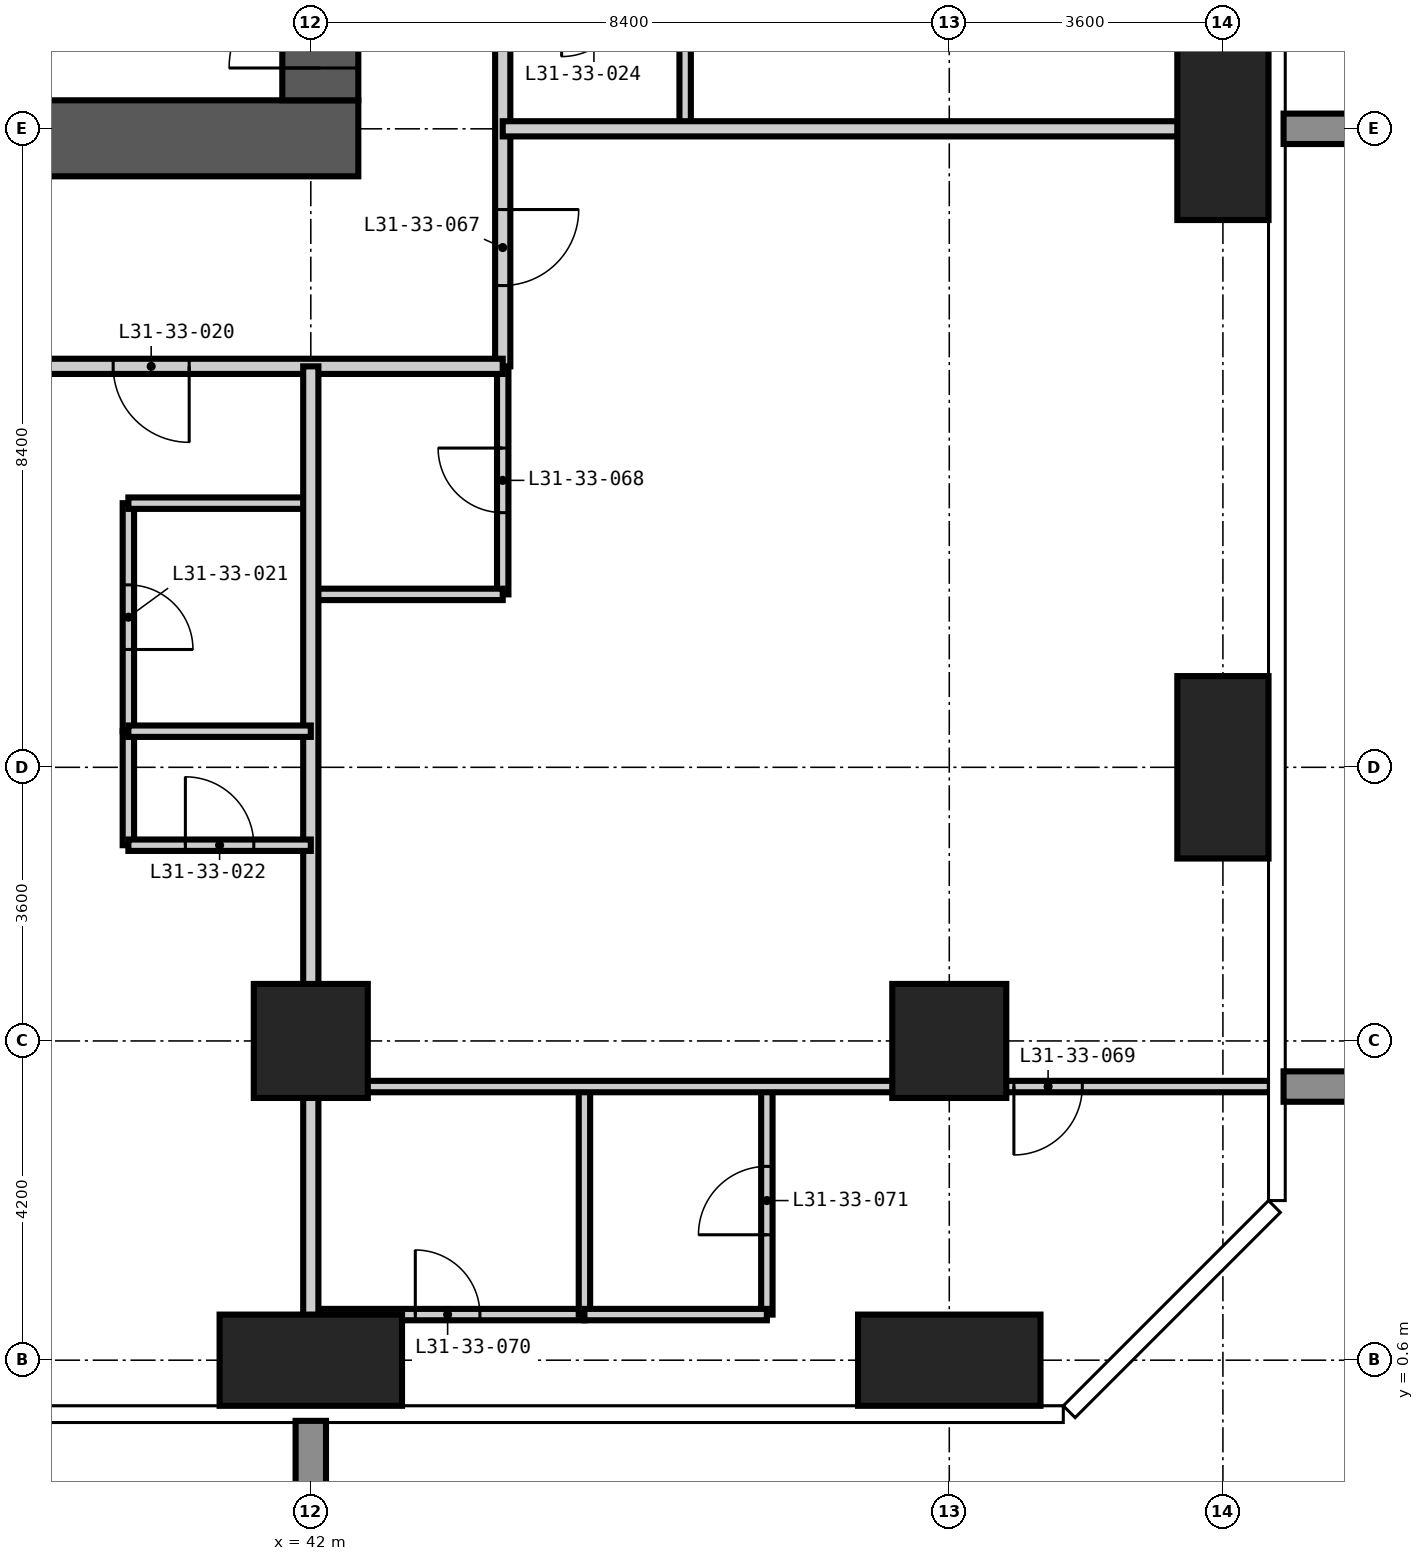
"""IFC4 building model, lengths in metres.
Left out: names, types, materials, properties, quantities, classifications, styles, units other than length and angle.
Written with IfcOpenShell. Run it as: python <this file> out.ifc"""

import sys

from ifc_helpers import new_model, si_unit, direction, frame, frame_2d, origin, origin_2d, place, context, subcontext, project, spatial, rectangle, extrude, element, fill, save


model = new_model("IFC4")
c1 = context("Model", 3, precision=1e-05, world=origin(), true_north=direction((0.0, 1.0)))
c2 = subcontext(c1, "Body", "Model", "MODEL_VIEW")
j1 = project(units=[si_unit("LENGTHUNIT", "METRE"), si_unit("PLANEANGLEUNIT", "RADIAN")], contexts=[c1])
p1 = place(None, origin())
s1 = spatial("IfcSite", under=j1, at=p1, CompositionType="ELEMENT")
p2 = place(p1, origin())
s2 = spatial("IfcBuilding", under=s1, at=p2, CompositionType="ELEMENT")
p3 = place(p2, frame((0.0, 0.0, 122.4)))
s3 = spatial("IfcBuildingStorey", under=s2, at=p3, CompositionType="ELEMENT", Elevation=122.4)
p4 = place(p3, frame((42.0, 0.6, -0.35), z_axis=(0.0, 0.0, 1.0), x_axis=(1.0, 0.0, 0.0)))
e1 = element("IfcColumn", 1, at=p4, inside=s3, PredefinedType="COLUMN", context=c2, shape_type="SweptSolid", body=[
    extrude(rectangle(XDim=2.4, YDim=1.2, at=origin_2d()), origin(), (0.0, 0.0, 1.0), 3.6),
])
p5 = place(p3, frame((42.0, 4.8, -0.35), z_axis=(0.0, 0.0, 1.0), x_axis=(1.0, 0.0, 0.0)))
e2 = element("IfcColumn", 2, at=p5, inside=s3, PredefinedType="COLUMN", context=c2, shape_type="SweptSolid", body=[
    extrude(rectangle(XDim=1.5, YDim=1.5, at=origin_2d()), origin(), (0.0, 0.0, 1.0), 3.6),
])
p6 = place(p3, frame((50.4, 0.6, -0.35), z_axis=(0.0, 0.0, 1.0), x_axis=(1.0, 0.0, 0.0)))
e3 = element("IfcColumn", 3, at=p6, inside=s3, PredefinedType="COLUMN", context=c2, shape_type="SweptSolid", body=[
    extrude(rectangle(XDim=2.4, YDim=1.2, at=origin_2d()), origin(), (0.0, 0.0, 1.0), 3.6),
])
p7 = place(p3, frame((50.4, 4.8, -0.35), z_axis=(0.0, 0.0, 1.0), x_axis=(1.0, 0.0, 0.0)))
e4 = element("IfcColumn", 4, at=p7, inside=s3, PredefinedType="COLUMN", context=c2, shape_type="SweptSolid", body=[
    extrude(rectangle(XDim=1.5, YDim=1.5, at=origin_2d()), origin(), (0.0, 0.0, 1.0), 3.6),
])
for number, where, z_axis, x_axis in (
    (5, (54.0, 8.4, -0.35), (0.0, 0.0, 1.0), (1.0, 0.0, 0.0)),
    (6, (54.0, 16.8, -0.35), (0.0, 0.0, 1.0), (1.0, 0.0, 0.0)),
):
    element("IfcColumn", number, at=place(p3, frame(where, z_axis=z_axis, x_axis=x_axis)), inside=s3, PredefinedType="COLUMN", context=c2, shape_type="SweptSolid", body=[
        extrude(rectangle(XDim=1.2, YDim=2.4, at=origin_2d()), origin(), (0.0, 0.0, 1.0), 3.6),
    ])
p8 = place(p3, frame((16.175, 16.675, -0.35), z_axis=(0.0, 0.0, 1.0), x_axis=(1.0, 0.0, 0.0)))
e7 = element("IfcWall", 7, at=p8, inside=s3, PredefinedType="SHEAR", context=c2, shape_type="SweptSolid", body=[
    extrude(rectangle(XDim=26.45, YDim=1.0, at=frame_2d((13.225, 0.0))), origin(), (0.0, 0.0, 1.0), 3.6),
])
p9 = place(p8, frame((12.725, 0.0, 0.35)))
e8 = element("IfcOpeningElement", 8, at=p9, cuts=e7, PredefinedType="OPENING", context=c2, shape_type="SweptSolid", body=[
    extrude(rectangle(XDim=1.0, YDim=2.1, at=frame_2d((0.5, 1.05))), frame((0.0, 0.51, 0.0), z_axis=(0.0, -1.0, 0.0), x_axis=(1.0, 0.0, 0.0)), (0.0, 0.0, 1.0), 1.02),
])
p10 = place(p8, frame((19.025, 0.0, 0.35)))
e9 = element("IfcOpeningElement", 9, at=p10, cuts=e7, PredefinedType="OPENING", context=c2, shape_type="SweptSolid", body=[
    extrude(rectangle(XDim=1.0, YDim=2.1, at=frame_2d((0.5, 1.05))), frame((0.0, 0.51, 0.0), z_axis=(0.0, -1.0, 0.0), x_axis=(1.0, 0.0, 0.0)), (0.0, 0.0, 1.0), 1.02),
])
p11 = place(p3, frame((42.125, 17.175, -0.35), z_axis=(0.0, 0.0, 1.0), x_axis=(0.0, 1.0, 0.0)))
e10 = element("IfcWall", 10, at=p11, inside=s3, PredefinedType="SHEAR", context=c2, shape_type="SweptSolid", body=[
    extrude(rectangle(XDim=24.45, YDim=1.0, at=frame_2d((12.225, 0.0))), origin(), (0.0, 0.0, 1.0), 3.6),
])
p12 = place(p11, frame((0.425, 0.0, 0.35)))
e11 = element("IfcOpeningElement", 11, at=p12, cuts=e10, PredefinedType="OPENING", context=c2, shape_type="SweptSolid", body=[
    extrude(rectangle(XDim=1.2, YDim=2.2, at=frame_2d((0.6, 1.1))), frame((0.0, 0.51, 0.0), z_axis=(0.0, -1.0, 0.0), x_axis=(1.0, 0.0, 0.0)), (0.0, 0.0, 1.0), 1.02),
])
p13 = place(p11, frame((11.325, 0.0, 0.35)))
e12 = element("IfcOpeningElement", 12, at=p13, cuts=e10, PredefinedType="OPENING", context=c2, shape_type="SweptSolid", body=[
    extrude(rectangle(XDim=1.8, YDim=2.2, at=frame_2d((0.9, 1.1))), frame((0.0, 0.51, 0.0), z_axis=(0.0, -1.0, 0.0), x_axis=(1.0, 0.0, 0.0)), (0.0, 0.0, 1.0), 1.02),
])
p14 = place(p11, frame((20.125, 0.0, 0.35)))
e13 = element("IfcOpeningElement", 13, at=p14, cuts=e10, PredefinedType="OPENING", context=c2, shape_type="SweptSolid", body=[
    extrude(rectangle(XDim=1.0, YDim=2.1, at=frame_2d((0.5, 1.05))), frame((0.0, 0.51, 0.0), z_axis=(0.0, -1.0, 0.0), x_axis=(1.0, 0.0, 0.0)), (0.0, 0.0, 1.0), 1.02),
])
p15 = place(p3, frame((39.6, 8.875, 0.0), z_axis=(0.0, 0.0, 1.0), x_axis=(0.0, 1.0, 0.0)))
e14 = element("IfcWall", 14, at=p15, inside=s3, PredefinedType="PARTITIONING", context=c2, shape_type="SweptSolid", body=[
    extrude(rectangle(XDim=3.0, YDim=0.15, at=frame_2d((1.5, 0.0))), origin(), (0.0, 0.0, 1.0), 3.25),
])
p16 = place(p15, frame((1.075, 0.0, 0.0)))
e15 = element("IfcOpeningElement", 15, at=p16, cuts=e14, PredefinedType="OPENING", context=c2, shape_type="SweptSolid", body=[
    extrude(rectangle(XDim=0.85, YDim=2.1, at=frame_2d((0.425, 1.05))), frame((0.0, 0.085, 0.0), z_axis=(0.0, -1.0, 0.0), x_axis=(1.0, 0.0, 0.0)), (0.0, 0.0, 1.0), 0.17),
])
p17 = place(p3, frame((44.525, 10.675, 0.0), z_axis=(0.0, 0.0, 1.0), x_axis=(0.0, 1.0, 0.0)))
e16 = element("IfcWall", 16, at=p17, inside=s3, PredefinedType="PARTITIONING", context=c2, shape_type="SweptSolid", body=[
    extrude(rectangle(XDim=3.0, YDim=0.15, at=frame_2d((1.5, 0.0))), origin(), (0.0, 0.0, 1.0), 3.25),
])
p18 = place(p17, frame((1.075, 0.0, 0.0)))
e17 = element("IfcOpeningElement", 17, at=p18, cuts=e16, PredefinedType="OPENING", context=c2, shape_type="SweptSolid", body=[
    extrude(rectangle(XDim=0.85, YDim=2.1, at=frame_2d((0.425, 1.05))), frame((0.0, 0.085, 0.0), z_axis=(0.0, -1.0, 0.0), x_axis=(1.0, 0.0, 0.0)), (0.0, 0.0, 1.0), 0.17),
])
p19 = place(p3, frame((46.925, 16.8, 0.0), z_axis=(0.0, 0.0, 1.0), x_axis=(0.0, 1.0, 0.0)))
e18 = element("IfcWall", 18, at=p19, inside=s3, PredefinedType="PARTITIONING", context=c2, shape_type="SweptSolid", body=[
    extrude(rectangle(XDim=1.8, YDim=0.15, at=frame_2d((0.9, 0.0))), origin(), (0.0, 0.0, 1.0), 3.25),
])
p20 = place(p3, frame((42.0, 1.2, 0.0), z_axis=(0.0, 0.0, 1.0), x_axis=(1.0, 0.0, 0.0)))
e19 = element("IfcWall", 19, at=p20, inside=s3, PredefinedType="PARTITIONING", context=c2, shape_type="SweptSolid", body=[
    extrude(rectangle(XDim=3.6, YDim=0.15, at=frame_2d((1.8, 0.0))), origin(), (0.0, 0.0, 1.0), 3.25),
])
p21 = place(p20, frame((1.375, 0.0, 0.0)))
e20 = element("IfcOpeningElement", 20, at=p21, cuts=e19, PredefinedType="OPENING", context=c2, shape_type="SweptSolid", body=[
    extrude(rectangle(XDim=0.85, YDim=2.1, at=frame_2d((0.425, 1.05))), frame((0.0, 0.085, 0.0), z_axis=(0.0, -1.0, 0.0), x_axis=(1.0, 0.0, 0.0)), (0.0, 0.0, 1.0), 0.17),
])
p22 = place(p3, frame((42.0, 10.675, 0.0), z_axis=(0.0, 0.0, 1.0), x_axis=(1.0, 0.0, 0.0)))
e21 = element("IfcWall", 21, at=p22, inside=s3, PredefinedType="PARTITIONING", context=c2, shape_type="SweptSolid", body=[
    extrude(rectangle(XDim=2.525, YDim=0.15, at=frame_2d((1.262, 0.0))), origin(), (0.0, 0.0, 1.0), 3.25),
])
p23 = place(p3, frame((39.6, 11.875, 0.0), z_axis=(0.0, 0.0, 1.0), x_axis=(1.0, 0.0, 0.0)))
e22 = element("IfcWall", 22, at=p23, inside=s3, PredefinedType="PARTITIONING", context=c2, shape_type="SweptSolid", body=[
    extrude(rectangle(XDim=2.4, YDim=0.15, at=frame_2d((1.2, 0.0))), origin(), (0.0, 0.0, 1.0), 3.25),
])
p24 = place(p3, frame((44.525, 45.725, 0.0), z_axis=(0.0, 0.0, 1.0), x_axis=(0.0, -1.0, 0.0)))
e23 = element("IfcWall", 23, at=p24, inside=s3, PredefinedType="PARTITIONING", context=c2, shape_type="SweptSolid", body=[
    extrude(rectangle(XDim=32.05, YDim=0.2, at=frame_2d((16.025, 0.0))), origin(), (0.0, 0.0, 1.0), 3.25),
])
p25 = place(p24, frame((25.425, 0.0, 0.0)))
e24 = element("IfcOpeningElement", 24, at=p25, cuts=e23, PredefinedType="OPENING", context=c2, shape_type="SweptSolid", body=[
    extrude(rectangle(XDim=1.0, YDim=2.2, at=frame_2d((0.5, 1.1))), frame((0.0, 0.11, 0.0), z_axis=(0.0, -1.0, 0.0), x_axis=(1.0, 0.0, 0.0)), (0.0, 0.0, 1.0), 0.22),
])
p26 = place(p24, frame((14.625, 0.0, 0.0)))
e25 = element("IfcOpeningElement", 25, at=p26, cuts=e23, PredefinedType="OPENING", context=c2, shape_type="SweptSolid", body=[
    extrude(rectangle(XDim=1.0, YDim=2.2, at=frame_2d((0.5, 1.1))), frame((0.0, 0.11, 0.0), z_axis=(0.0, -1.0, 0.0), x_axis=(1.0, 0.0, 0.0)), (0.0, 0.0, 1.0), 0.22),
])
p27 = place(p24, frame((8.625, 0.0, 0.0)))
e26 = element("IfcOpeningElement", 26, at=p27, cuts=e23, PredefinedType="OPENING", context=c2, shape_type="SweptSolid", body=[
    extrude(rectangle(XDim=1.0, YDim=2.2, at=frame_2d((0.5, 1.1))), frame((0.0, 0.11, 0.0), z_axis=(0.0, -1.0, 0.0), x_axis=(1.0, 0.0, 0.0)), (0.0, 0.0, 1.0), 0.22),
])
p28 = place(p24, frame((29.987, 0.0, 0.0)))
e27 = element("IfcOpeningElement", 27, at=p28, cuts=e23, PredefinedType="OPENING", context=c2, shape_type="SweptSolid", body=[
    extrude(rectangle(XDim=1.0, YDim=2.2, at=frame_2d((0.5, 1.1))), frame((0.0, 0.11, 0.0), z_axis=(0.0, -1.0, 0.0), x_axis=(1.0, 0.0, 0.0)), (0.0, 0.0, 1.0), 0.22),
])
p29 = place(p24, frame((1.363, 0.0, 0.0)))
e28 = element("IfcOpeningElement", 28, at=p29, cuts=e23, PredefinedType="OPENING", context=c2, shape_type="SweptSolid", body=[
    extrude(rectangle(XDim=1.0, YDim=2.2, at=frame_2d((0.5, 1.1))), frame((0.0, 0.11, 0.0), z_axis=(0.0, -1.0, 0.0), x_axis=(1.0, 0.0, 0.0)), (0.0, 0.0, 1.0), 0.22),
])
p30 = place(p3, frame((44.525, 13.675, 0.0), z_axis=(0.0, 0.0, 1.0), x_axis=(-1.0, 0.0, 0.0)))
e29 = element("IfcWall", 29, at=p30, inside=s3, PredefinedType="PARTITIONING", context=c2, shape_type="SweptSolid", body=[
    extrude(rectangle(XDim=31.925, YDim=0.2, at=frame_2d((15.962, 0.0))), origin(), (0.0, 0.0, 1.0), 3.25),
])
p31 = place(p30, frame((25.125, 0.0, 0.0)))
e30 = element("IfcOpeningElement", 30, at=p31, cuts=e29, PredefinedType="OPENING", context=c2, shape_type="SweptSolid", body=[
    extrude(rectangle(XDim=1.0, YDim=2.2, at=frame_2d((0.5, 1.1))), frame((0.0, 0.11, 0.0), z_axis=(0.0, -1.0, 0.0), x_axis=(1.0, 0.0, 0.0)), (0.0, 0.0, 1.0), 0.22),
])
p32 = place(p30, frame((18.825, 0.0, 0.0)))
e31 = element("IfcOpeningElement", 31, at=p32, cuts=e29, PredefinedType="OPENING", context=c2, shape_type="SweptSolid", body=[
    extrude(rectangle(XDim=1.0, YDim=2.2, at=frame_2d((0.5, 1.1))), frame((0.0, 0.11, 0.0), z_axis=(0.0, -1.0, 0.0), x_axis=(1.0, 0.0, 0.0)), (0.0, 0.0, 1.0), 0.22),
])
p33 = place(p30, frame((10.425, 0.0, 0.0)))
e32 = element("IfcOpeningElement", 32, at=p33, cuts=e29, PredefinedType="OPENING", context=c2, shape_type="SweptSolid", body=[
    extrude(rectangle(XDim=1.0, YDim=2.2, at=frame_2d((0.5, 1.1))), frame((0.0, 0.11, 0.0), z_axis=(0.0, -1.0, 0.0), x_axis=(1.0, 0.0, 0.0)), (0.0, 0.0, 1.0), 0.22),
])
p34 = place(p30, frame((4.125, 0.0, 0.0)))
e33 = element("IfcOpeningElement", 33, at=p34, cuts=e29, PredefinedType="OPENING", context=c2, shape_type="SweptSolid", body=[
    extrude(rectangle(XDim=1.0, YDim=2.2, at=frame_2d((0.5, 1.1))), frame((0.0, 0.11, 0.0), z_axis=(0.0, -1.0, 0.0), x_axis=(1.0, 0.0, 0.0)), (0.0, 0.0, 1.0), 0.22),
])
p35 = place(p3, frame((42.0, -0.018, 0.0), z_axis=(0.0, 0.0, 1.0), x_axis=(0.0, 1.0, 0.0)))
e34 = element("IfcWall", 34, at=p35, inside=s3, PredefinedType="PARTITIONING", context=c2, shape_type="SweptSolid", body=[
    extrude(rectangle(XDim=13.693, YDim=0.2, at=frame_2d((6.847, 0.0))), origin(), (0.0, 0.0, 1.0), 3.25),
])
p36 = place(p3, frame((44.525, 16.8, 0.0), z_axis=(0.0, 0.0, 1.0), x_axis=(1.0, 0.0, 0.0)))
e35 = element("IfcWall", 35, at=p36, inside=s3, PredefinedType="PARTITIONING", context=c2, shape_type="SweptSolid", body=[
    extrude(rectangle(XDim=10.093, YDim=0.2, at=frame_2d((5.046, 0.0))), origin(), (0.0, 0.0, 1.0), 3.25),
])
p37 = place(p3, frame((39.6, 7.375, 0.0), z_axis=(0.0, 0.0, 1.0), x_axis=(0.0, 1.0, 0.0)))
e36 = element("IfcWall", 36, at=p37, inside=s3, PredefinedType="PARTITIONING", context=c2, shape_type="SweptSolid", body=[
    extrude(rectangle(XDim=1.5, YDim=0.15, at=frame_2d((0.75, 0.0))), origin(), (0.0, 0.0, 1.0), 3.25),
])
p38 = place(p3, frame((45.6, 1.2, 0.0), z_axis=(0.0, 0.0, 1.0), x_axis=(0.0, 1.0, 0.0)))
e37 = element("IfcWall", 37, at=p38, inside=s3, PredefinedType="PARTITIONING", context=c2, shape_type="SweptSolid", body=[
    extrude(rectangle(XDim=3.0, YDim=0.15, at=frame_2d((1.5, 0.0))), origin(), (0.0, 0.0, 1.0), 3.25),
])
p39 = place(p3, frame((48.0, 1.2, 0.0), z_axis=(0.0, 0.0, 1.0), x_axis=(0.0, 1.0, 0.0)))
e38 = element("IfcWall", 38, at=p39, inside=s3, PredefinedType="PARTITIONING", context=c2, shape_type="SweptSolid", body=[
    extrude(rectangle(XDim=3.0, YDim=0.15, at=frame_2d((1.5, 0.0))), origin(), (0.0, 0.0, 1.0), 3.25),
])
p40 = place(p39, frame((1.05, 0.0, 0.0)))
e39 = element("IfcOpeningElement", 39, at=p40, cuts=e38, PredefinedType="OPENING", context=c2, shape_type="SweptSolid", body=[
    extrude(rectangle(XDim=0.9, YDim=2.1, at=frame_2d((0.45, 1.05))), frame((0.0, 0.085, 0.0), z_axis=(0.0, -1.0, 0.0), x_axis=(1.0, 0.0, 0.0)), (0.0, 0.0, 1.0), 0.17),
])
p41 = place(p3, frame((45.6, 1.2, 0.0), z_axis=(0.0, 0.0, 1.0), x_axis=(1.0, 0.0, 0.0)))
e40 = element("IfcWall", 40, at=p41, inside=s3, PredefinedType="PARTITIONING", context=c2, shape_type="SweptSolid", body=[
    extrude(rectangle(XDim=2.4, YDim=0.15, at=frame_2d((1.2, 0.0))), origin(), (0.0, 0.0, 1.0), 3.25),
])
p42 = place(p3, frame((42.0, 4.2, 0.0), z_axis=(0.0, 0.0, 1.0), x_axis=(1.0, 0.0, 0.0)))
e41 = element("IfcWall", 41, at=p42, inside=s3, PredefinedType="PARTITIONING", context=c2, shape_type="SweptSolid", body=[
    extrude(rectangle(XDim=12.618, YDim=0.15, at=frame_2d((6.309, 0.0))), origin(), (0.0, 0.0, 1.0), 3.25),
])
p43 = place(p42, frame((9.25, 0.0, 0.0)))
e42 = element("IfcOpeningElement", 42, at=p43, cuts=e41, PredefinedType="OPENING", context=c2, shape_type="SweptSolid", body=[
    extrude(rectangle(XDim=0.9, YDim=2.1, at=frame_2d((0.45, 1.05))), frame((0.0, 0.085, 0.0), z_axis=(0.0, -1.0, 0.0), x_axis=(1.0, 0.0, 0.0)), (0.0, 0.0, 1.0), 0.17),
])
p44 = place(p3, frame((39.6, 7.375, 0.0), z_axis=(0.0, 0.0, 1.0), x_axis=(1.0, 0.0, 0.0)))
e43 = element("IfcWall", 43, at=p44, inside=s3, PredefinedType="PARTITIONING", context=c2, shape_type="SweptSolid", body=[
    extrude(rectangle(XDim=2.4, YDim=0.15, at=frame_2d((1.2, 0.0))), origin(), (0.0, 0.0, 1.0), 3.25),
])
p45 = place(p44, frame((0.75, 0.0, 0.0)))
e44 = element("IfcOpeningElement", 44, at=p45, cuts=e43, PredefinedType="OPENING", context=c2, shape_type="SweptSolid", body=[
    extrude(rectangle(XDim=0.9, YDim=2.1, at=frame_2d((0.45, 1.05))), frame((0.0, 0.085, 0.0), z_axis=(0.0, -1.0, 0.0), x_axis=(1.0, 0.0, 0.0)), (0.0, 0.0, 1.0), 0.17),
])
p46 = place(p3, frame((39.6, 8.875, 0.0), z_axis=(0.0, 0.0, 1.0), x_axis=(1.0, 0.0, 0.0)))
e45 = element("IfcWall", 45, at=p46, inside=s3, PredefinedType="PARTITIONING", context=c2, shape_type="SweptSolid", body=[
    extrude(rectangle(XDim=2.4, YDim=0.15, at=frame_2d((1.2, 0.0))), origin(), (0.0, 0.0, 1.0), 3.25),
])
p47 = place(p12, origin())
e46 = element("IfcDoor", 46, at=p47, inside=s3, OperationType="SINGLE_SWING_LEFT", PredefinedType="DOOR", context=c2, shape_type="SweptSolid", body=[
    extrude(rectangle(XDim=1.2, YDim=2.2, at=frame_2d((0.6, 1.1))), frame((0.0, 0.025, 0.0), z_axis=(0.0, -1.0, 0.0), x_axis=(1.0, 0.0, 0.0)), (0.0, 0.0, 1.0), 0.05),
])
fill(e11, e46)
p48 = place(p34, origin())
e47 = element("IfcDoor", 47, at=p48, inside=s3, OperationType="SINGLE_SWING_LEFT", PredefinedType="DOOR", context=c2, shape_type="SweptSolid", body=[
    extrude(rectangle(XDim=1.0, YDim=2.2, at=frame_2d((0.5, 1.1))), frame((0.0, 0.025, 0.0), z_axis=(0.0, -1.0, 0.0), x_axis=(1.0, 0.0, 0.0)), (0.0, 0.0, 1.0), 0.05),
])
fill(e33, e47)
p49 = place(p16, frame((0.85, 0.0, 0.0), z_axis=(0.0, 0.0, 1.0), x_axis=(-1.0, 0.0, 0.0)))
e48 = element("IfcDoor", 48, at=p49, inside=s3, OperationType="SINGLE_SWING_RIGHT", PredefinedType="DOOR", context=c2, shape_type="SweptSolid", body=[
    extrude(rectangle(XDim=0.85, YDim=2.1, at=frame_2d((0.425, 1.05))), frame((0.0, 0.025, 0.0), z_axis=(0.0, -1.0, 0.0), x_axis=(1.0, 0.0, 0.0)), (0.0, 0.0, 1.0), 0.05),
])
fill(e15, e48)
p50 = place(p45, origin())
e49 = element("IfcDoor", 49, at=p50, inside=s3, OperationType="SINGLE_SWING_LEFT", PredefinedType="DOOR", context=c2, shape_type="SweptSolid", body=[
    extrude(rectangle(XDim=0.9, YDim=2.1, at=frame_2d((0.45, 1.05))), frame((0.0, 0.025, 0.0), z_axis=(0.0, -1.0, 0.0), x_axis=(1.0, 0.0, 0.0)), (0.0, 0.0, 1.0), 0.05),
])
fill(e44, e49)
p51 = place(p28, origin())
e50 = element("IfcDoor", 50, at=p51, inside=s3, OperationType="SINGLE_SWING_LEFT", PredefinedType="DOOR", context=c2, shape_type="SweptSolid", body=[
    extrude(rectangle(XDim=1.0, YDim=2.2, at=frame_2d((0.5, 1.1))), frame((0.0, 0.025, 0.0), z_axis=(0.0, -1.0, 0.0), x_axis=(1.0, 0.0, 0.0)), (0.0, 0.0, 1.0), 0.05),
])
fill(e27, e50)
p52 = place(p18, origin())
e51 = element("IfcDoor", 51, at=p52, inside=s3, OperationType="SINGLE_SWING_RIGHT", PredefinedType="DOOR", context=c2, shape_type="SweptSolid", body=[
    extrude(rectangle(XDim=0.85, YDim=2.1, at=frame_2d((0.425, 1.05))), frame((0.0, 0.025, 0.0), z_axis=(0.0, -1.0, 0.0), x_axis=(1.0, 0.0, 0.0)), (0.0, 0.0, 1.0), 0.05),
])
fill(e17, e51)
p53 = place(p43, frame((0.9, 0.0, 0.0), z_axis=(0.0, 0.0, 1.0), x_axis=(-1.0, 0.0, 0.0)))
e52 = element("IfcDoor", 52, at=p53, inside=s3, OperationType="SINGLE_SWING_RIGHT", PredefinedType="DOOR", context=c2, shape_type="SweptSolid", body=[
    extrude(rectangle(XDim=0.9, YDim=2.1, at=frame_2d((0.45, 1.05))), frame((0.0, 0.025, 0.0), z_axis=(0.0, -1.0, 0.0), x_axis=(1.0, 0.0, 0.0)), (0.0, 0.0, 1.0), 0.05),
])
fill(e42, e52)
p54 = place(p21, origin())
e53 = element("IfcDoor", 53, at=p54, inside=s3, OperationType="SINGLE_SWING_LEFT", PredefinedType="DOOR", context=c2, shape_type="SweptSolid", body=[
    extrude(rectangle(XDim=0.85, YDim=2.1, at=frame_2d((0.425, 1.05))), frame((0.0, 0.025, 0.0), z_axis=(0.0, -1.0, 0.0), x_axis=(1.0, 0.0, 0.0)), (0.0, 0.0, 1.0), 0.05),
])
fill(e20, e53)
p55 = place(p40, origin())
e54 = element("IfcDoor", 54, at=p55, inside=s3, OperationType="SINGLE_SWING_LEFT", PredefinedType="DOOR", context=c2, shape_type="SweptSolid", body=[
    extrude(rectangle(XDim=0.9, YDim=2.1, at=frame_2d((0.45, 1.05))), frame((0.0, 0.025, 0.0), z_axis=(0.0, -1.0, 0.0), x_axis=(1.0, 0.0, 0.0)), (0.0, 0.0, 1.0), 0.05),
])
fill(e39, e54)
save(model, sys.argv[1])
